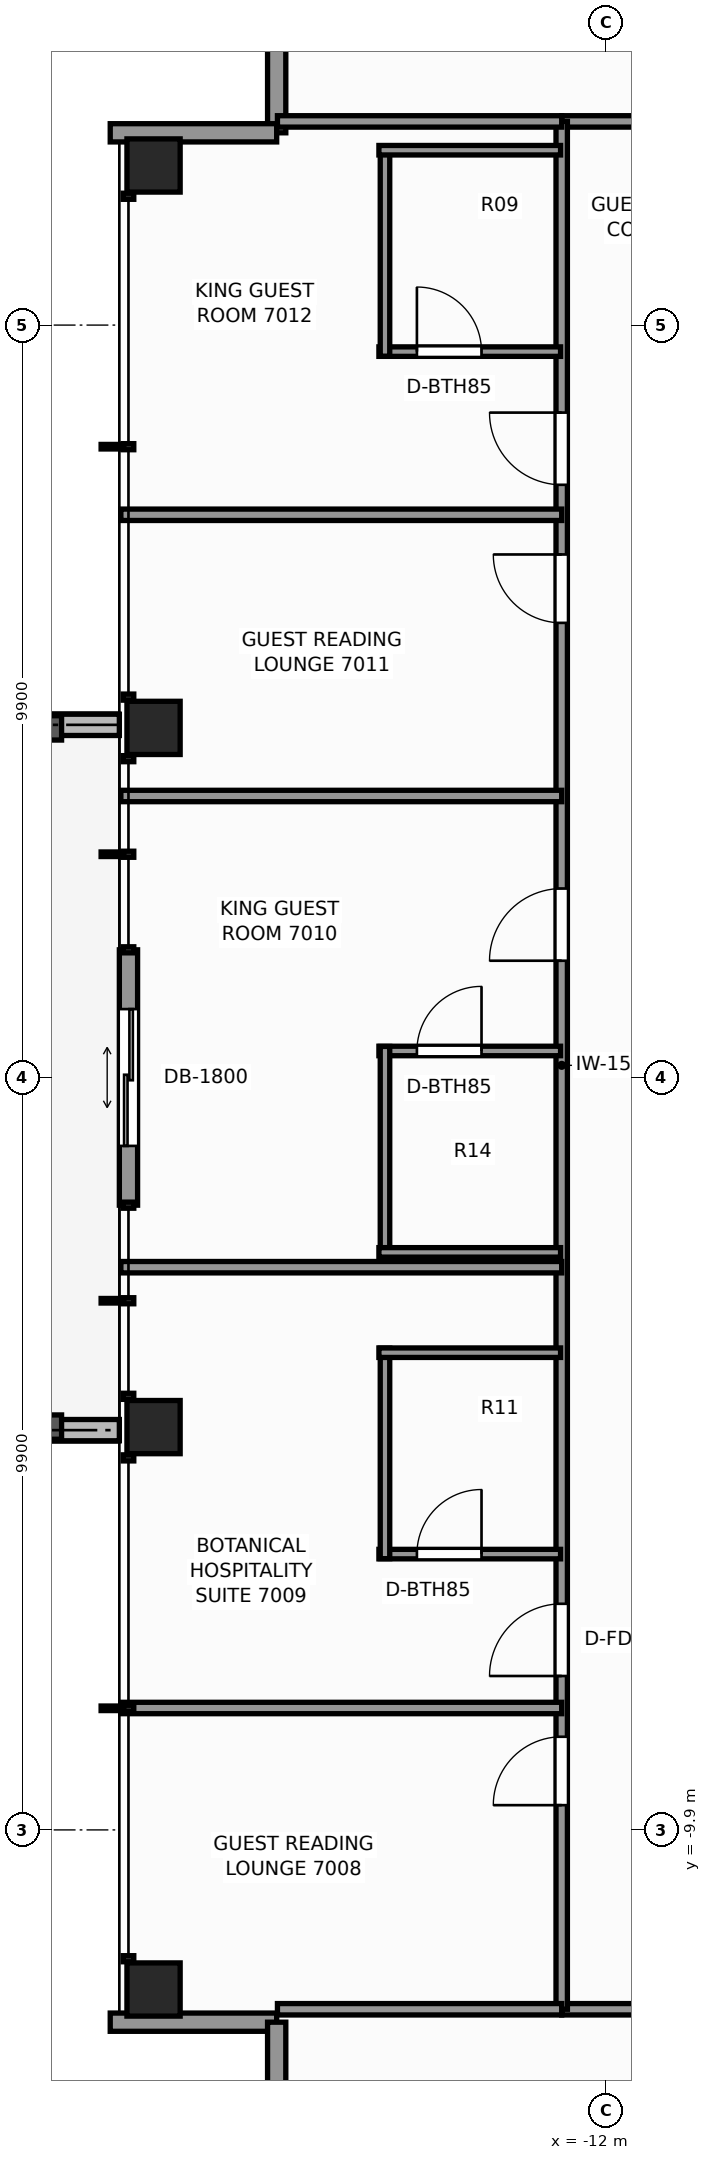
"""IFC4 building model, lengths in metres.
Left out: names, types, materials, properties, quantities, classifications, styles, units other than length and angle.
Written with IfcOpenShell. Run it as: python <this file> out.ifc"""

import sys

from ifc_helpers import new_model, si_unit, direction, frame, frame_2d, origin, origin_2d, place, context, subcontext, project, spatial, rectangle, extrude, element, fill, save


model = new_model("IFC4")
c1 = context("Model", 3, precision=1e-05, world=origin(), true_north=direction((0.0, 1.0)))
c2 = subcontext(c1, "Body", "Model", "MODEL_VIEW")
j1 = project(units=[si_unit("LENGTHUNIT", "METRE"), si_unit("PLANEANGLEUNIT", "RADIAN")], contexts=[c1])
p1 = place(None, origin())
s1 = spatial("IfcSite", under=j1, at=p1, CompositionType="ELEMENT")
p2 = place(p1, origin())
s2 = spatial("IfcBuilding", under=s1, at=p2, CompositionType="ELEMENT")
p3 = place(p2, frame((0.0, 0.0, 240.9)))
s3 = spatial("IfcBuildingStorey", under=s2, at=p3, CompositionType="ELEMENT", Elevation=240.9)
for number, where, z_axis, x_axis in (
    (1, (-17.95, -12.0, 0.0), (0.0, 0.0, 1.0), (1.0, 0.0, 0.0)),
    (2, (-17.95, -4.6, 0.0), (0.0, 0.0, 1.0), (1.0, 0.0, 0.0)),
    (3, (-17.95, 4.6, 0.0), (0.0, 0.0, 1.0), (1.0, 0.0, 0.0)),
    (4, (-17.95, 12.0, 0.0), (0.0, 0.0, 1.0), (1.0, 0.0, 0.0)),
):
    element("IfcColumn", number, at=place(p3, frame(where, z_axis=z_axis, x_axis=x_axis)), inside=s3, PredefinedType="COLUMN", context=c2, shape_type="SweptSolid", body=[
        extrude(rectangle(XDim=0.7, YDim=0.7, at=origin_2d()), origin(), (0.0, 0.0, 1.0), 3.5),
    ])
for number, where, z_axis, x_axis in (
    (5, (-21.7, -4.64, -0.07), (0.0, 0.0, 1.0), (1.0, 0.0, 0.0)),
    (6, (-18.4, 4.64, -0.07), (0.0, 0.0, 1.0), (-1.0, 0.0, 0.0)),
):
    element("IfcWall", number, at=place(p3, frame(where, z_axis=z_axis, x_axis=x_axis)), inside=s3, PredefinedType="PARAPET", context=c2, shape_type="SweptSolid", body=[
        extrude(rectangle(XDim=3.3, YDim=0.28, at=frame_2d((1.65, 0.0))), origin(), (0.0, 0.0, 1.0), 0.42),
    ])
p4 = place(p3, frame((-16.33, 12.43, 0.0), z_axis=(0.0, 0.0, 1.0), x_axis=(0.0, 1.0, 0.0)))
e7 = element("IfcWall", 7, at=p4, inside=s3, PredefinedType="STANDARD", context=c2, shape_type="SweptSolid", body=[
    extrude(rectangle(XDim=2.19, YDim=0.24, at=frame_2d((1.095, 0.0))), origin(), (0.0, 0.0, 1.0), 2.633),
])
p5 = place(p3, frame((-18.52, 12.43, 0.0), z_axis=(0.0, 0.0, 1.0), x_axis=(1.0, 0.0, 0.0)))
e8 = element("IfcWall", 8, at=p5, inside=s3, PredefinedType="STANDARD", context=c2, shape_type="SweptSolid", body=[
    extrude(rectangle(XDim=2.19, YDim=0.24, at=frame_2d((1.095, 0.0))), origin(), (0.0, 0.0, 1.0), 2.633),
])
p6 = place(p3, frame((-18.28, -1.68, 0.0), z_axis=(0.0, 0.0, 1.0), x_axis=(0.0, 1.0, 0.0)))
e9 = element("IfcWall", 9, at=p6, inside=s3, PredefinedType="STANDARD", context=c2, shape_type="SweptSolid", body=[
    extrude(rectangle(XDim=3.36, YDim=0.24, at=frame_2d((1.68, 0.0))), origin(), (0.0, 0.0, 1.0), 3.25),
])
p7 = place(p6, frame((0.78, 0.0, 0.0)))
e10 = element("IfcOpeningElement", 10, at=p7, cuts=e9, PredefinedType="OPENING", context=c2, shape_type="SweptSolid", body=[
    extrude(rectangle(XDim=1.8, YDim=2.2, at=frame_2d((0.9, 1.1))), frame((0.0, 0.13, 0.0), z_axis=(0.0, -1.0, 0.0), x_axis=(1.0, 0.0, 0.0)), (0.0, 0.0, 1.0), 0.26),
])
p8 = place(p3, frame((-16.33, -12.43, 0.0), z_axis=(0.0, 0.0, 1.0), x_axis=(-1.0, 0.0, 0.0)))
e11 = element("IfcWall", 11, at=p8, inside=s3, PredefinedType="STANDARD", context=c2, shape_type="SweptSolid", body=[
    extrude(rectangle(XDim=2.19, YDim=0.24, at=frame_2d((1.095, 0.0))), origin(), (0.0, 0.0, 1.0), 2.633),
])
p9 = place(p3, frame((-16.33, -14.62, 0.0), z_axis=(0.0, 0.0, 1.0), x_axis=(0.0, 1.0, 0.0)))
e12 = element("IfcWall", 12, at=p9, inside=s3, PredefinedType="STANDARD", context=c2, shape_type="SweptSolid", body=[
    extrude(rectangle(XDim=2.19, YDim=0.24, at=frame_2d((1.095, 0.0))), origin(), (0.0, 0.0, 1.0), 2.633),
])
p10 = place(p3, frame((-12.58, -12.26, 0.0), z_axis=(0.0, 0.0, 1.0), x_axis=(1.0, 0.0, 0.0)))
e13 = element("IfcWall", 13, at=p10, inside=s3, PredefinedType="PARTITIONING", context=c2, shape_type="SweptSolid", body=[
    extrude(rectangle(XDim=24.84, YDim=0.15, at=frame_2d((12.42, 0.0))), origin(), (0.0, 0.0, 1.0), 2.539),
])
p11 = place(p10, frame((4.398, 0.0, 0.0)))
e14 = element("IfcOpeningElement", 14, at=p11, cuts=e13, PredefinedType="OPENING", context=c2, shape_type="SweptSolid", body=[
    extrude(rectangle(XDim=0.9, YDim=2.06, at=frame_2d((0.45, 1.03))), frame((0.0, 0.085, 0.0), z_axis=(0.0, -1.0, 0.0), x_axis=(1.0, 0.0, 0.0)), (0.0, 0.0, 1.0), 0.17),
])
p12 = place(p10, frame((8.99, 0.0, 0.0)))
e15 = element("IfcOpeningElement", 15, at=p12, cuts=e13, PredefinedType="OPENING", context=c2, shape_type="SweptSolid", body=[
    extrude(rectangle(XDim=0.9, YDim=2.06, at=frame_2d((0.45, 1.03))), frame((0.0, 0.085, 0.0), z_axis=(0.0, -1.0, 0.0), x_axis=(1.0, 0.0, 0.0)), (0.0, 0.0, 1.0), 0.17),
])
p13 = place(p10, frame((13.129, 0.0, 0.0)))
e16 = element("IfcOpeningElement", 16, at=p13, cuts=e13, PredefinedType="OPENING", context=c2, shape_type="SweptSolid", body=[
    extrude(rectangle(XDim=0.95, YDim=2.06, at=frame_2d((0.475, 1.03))), frame((0.0, 0.085, 0.0), z_axis=(0.0, -1.0, 0.0), x_axis=(1.0, 0.0, 0.0)), (0.0, 0.0, 1.0), 0.17),
])
p14 = place(p10, frame((18.402, 0.0, 0.0)))
e17 = element("IfcOpeningElement", 17, at=p14, cuts=e13, PredefinedType="OPENING", context=c2, shape_type="SweptSolid", body=[
    extrude(rectangle(XDim=0.9, YDim=2.06, at=frame_2d((0.45, 1.03))), frame((0.0, 0.085, 0.0), z_axis=(0.0, -1.0, 0.0), x_axis=(1.0, 0.0, 0.0)), (0.0, 0.0, 1.0), 0.17),
])
p15 = place(p10, frame((20.737, 0.0, 0.0)))
e18 = element("IfcOpeningElement", 18, at=p15, cuts=e13, PredefinedType="OPENING", context=c2, shape_type="SweptSolid", body=[
    extrude(rectangle(XDim=0.9, YDim=2.06, at=frame_2d((0.45, 1.03))), frame((0.0, 0.085, 0.0), z_axis=(0.0, -1.0, 0.0), x_axis=(1.0, 0.0, 0.0)), (0.0, 0.0, 1.0), 0.17),
])
p16 = place(p3, frame((-12.58, 12.58, 0.0), z_axis=(0.0, 0.0, 1.0), x_axis=(1.0, 0.0, 0.0)))
e19 = element("IfcWall", 19, at=p16, inside=s3, PredefinedType="PARTITIONING", context=c2, shape_type="SweptSolid", body=[
    extrude(rectangle(XDim=24.84, YDim=0.15, at=frame_2d((12.42, 0.0))), origin(), (0.0, 0.0, 1.0), 2.539),
])
p17 = place(p16, frame((3.321, 0.0, 0.0)))
e20 = element("IfcOpeningElement", 20, at=p17, cuts=e19, PredefinedType="OPENING", context=c2, shape_type="SweptSolid", body=[
    extrude(rectangle(XDim=0.95, YDim=2.06, at=frame_2d((0.475, 1.03))), frame((0.0, 0.085, 0.0), z_axis=(0.0, -1.0, 0.0), x_axis=(1.0, 0.0, 0.0)), (0.0, 0.0, 1.0), 0.17),
])
p18 = place(p16, frame((9.988, 0.0, 0.0)))
e21 = element("IfcOpeningElement", 21, at=p18, cuts=e19, PredefinedType="OPENING", context=c2, shape_type="SweptSolid", body=[
    extrude(rectangle(XDim=0.95, YDim=2.06, at=frame_2d((0.475, 1.03))), frame((0.0, 0.085, 0.0), z_axis=(0.0, -1.0, 0.0), x_axis=(1.0, 0.0, 0.0)), (0.0, 0.0, 1.0), 0.17),
])
p19 = place(p16, frame((19.986, 0.0, 0.0)))
e22 = element("IfcOpeningElement", 22, at=p19, cuts=e19, PredefinedType="OPENING", context=c2, shape_type="SweptSolid", body=[
    extrude(rectangle(XDim=0.95, YDim=2.06, at=frame_2d((0.475, 1.03))), frame((0.0, 0.085, 0.0), z_axis=(0.0, -1.0, 0.0), x_axis=(1.0, 0.0, 0.0)), (0.0, 0.0, 1.0), 0.17),
])
p20 = place(p3, frame((-12.58, -12.26, 0.0), z_axis=(0.0, 0.0, 1.0), x_axis=(0.0, 1.0, 0.0)))
e23 = element("IfcWall", 23, at=p20, inside=s3, PredefinedType="PARTITIONING", context=c2, shape_type="SweptSolid", body=[
    extrude(rectangle(XDim=24.84, YDim=0.15, at=frame_2d((12.42, 0.0))), origin(), (0.0, 0.0, 1.0), 2.539),
])
p21 = place(p20, frame((2.686, 0.0, 0.0)))
e24 = element("IfcOpeningElement", 24, at=p21, cuts=e23, PredefinedType="OPENING", context=c2, shape_type="SweptSolid", body=[
    extrude(rectangle(XDim=0.9, YDim=2.06, at=frame_2d((0.45, 1.03))), frame((0.0, 0.085, 0.0), z_axis=(0.0, -1.0, 0.0), x_axis=(1.0, 0.0, 0.0)), (0.0, 0.0, 1.0), 0.17),
])
p22 = place(p20, frame((4.385, 0.0, 0.0)))
e25 = element("IfcOpeningElement", 25, at=p22, cuts=e23, PredefinedType="OPENING", context=c2, shape_type="SweptSolid", body=[
    extrude(rectangle(XDim=0.95, YDim=2.06, at=frame_2d((0.475, 1.03))), frame((0.0, 0.085, 0.0), z_axis=(0.0, -1.0, 0.0), x_axis=(1.0, 0.0, 0.0)), (0.0, 0.0, 1.0), 0.17),
])
p23 = place(p20, frame((13.796, 0.0, 0.0)))
e26 = element("IfcOpeningElement", 26, at=p23, cuts=e23, PredefinedType="OPENING", context=c2, shape_type="SweptSolid", body=[
    extrude(rectangle(XDim=0.95, YDim=2.06, at=frame_2d((0.475, 1.03))), frame((0.0, 0.085, 0.0), z_axis=(0.0, -1.0, 0.0), x_axis=(1.0, 0.0, 0.0)), (0.0, 0.0, 1.0), 0.17),
])
p24 = place(p20, frame((18.242, 0.0, 0.0)))
e27 = element("IfcOpeningElement", 27, at=p24, cuts=e23, PredefinedType="OPENING", context=c2, shape_type="SweptSolid", body=[
    extrude(rectangle(XDim=0.9, YDim=2.06, at=frame_2d((0.45, 1.03))), frame((0.0, 0.085, 0.0), z_axis=(0.0, -1.0, 0.0), x_axis=(1.0, 0.0, 0.0)), (0.0, 0.0, 1.0), 0.17),
])
p25 = place(p20, frame((20.059, 0.0, 0.0)))
e28 = element("IfcOpeningElement", 28, at=p25, cuts=e23, PredefinedType="OPENING", context=c2, shape_type="SweptSolid", body=[
    extrude(rectangle(XDim=0.95, YDim=2.06, at=frame_2d((0.475, 1.03))), frame((0.0, 0.085, 0.0), z_axis=(0.0, -1.0, 0.0), x_axis=(1.0, 0.0, 0.0)), (0.0, 0.0, 1.0), 0.17),
])
for number, where, z_axis, x_axis in (
    (29, (-16.32, -12.26, 0.0), (0.0, 0.0, 1.0), (1.0, 0.0, 0.0)),
    (30, (-16.32, 12.58, 0.0), (0.0, 0.0, 1.0), (1.0, 0.0, 0.0)),
):
    element("IfcWall", number, at=place(p3, frame(where, z_axis=z_axis, x_axis=x_axis)), inside=s3, PredefinedType="PARTITIONING", context=c2, shape_type="SweptSolid", body=[
        extrude(rectangle(XDim=3.74, YDim=0.15, at=frame_2d((1.87, 0.0))), origin(), (0.0, 0.0, 1.0), 3.25),
    ])
for number, where, z_axis, x_axis in (
    (31, (-18.38, -8.296, 0.0), (0.0, 0.0, 1.0), (1.0, 0.0, 0.0)),
    (32, (-18.38, -2.496, 0.0), (0.0, 0.0, 1.0), (1.0, 0.0, 0.0)),
):
    element("IfcWall", number, at=place(p3, frame(where, z_axis=z_axis, x_axis=x_axis)), inside=s3, PredefinedType="PARTITIONING", context=c2, shape_type="SweptSolid", body=[
        extrude(rectangle(XDim=5.8, YDim=0.15, at=frame_2d((2.9, 0.0))), origin(), (0.0, 0.0, 1.0), 2.623),
    ])
p26 = place(p3, frame((-14.985, -6.271, 0.0), z_axis=(0.0, 0.0, 1.0), x_axis=(1.0, 0.0, 0.0)))
e33 = element("IfcWall", 33, at=p26, inside=s3, PredefinedType="PARTITIONING", context=c2, shape_type="SweptSolid", body=[
    extrude(rectangle(XDim=2.39, YDim=0.125, at=frame_2d((1.195, 0.0))), origin(), (0.0, 0.0, 1.0), 3.25),
])
p27 = place(p26, frame((0.5, 0.0, 0.0)))
e34 = element("IfcOpeningElement", 34, at=p27, cuts=e33, PredefinedType="OPENING", context=c2, shape_type="SweptSolid", body=[
    extrude(rectangle(XDim=0.85, YDim=2.03, at=frame_2d((0.425, 1.015))), frame((0.0, 0.073, 0.0), z_axis=(0.0, -1.0, 0.0), x_axis=(1.0, 0.0, 0.0)), (0.0, 0.0, 1.0), 0.145),
])
p28 = place(p3, frame((-14.905, -6.331, 0.0), z_axis=(0.0, 0.0, 1.0), x_axis=(0.0, 1.0, 0.0)))
e35 = element("IfcWall", 35, at=p28, inside=s3, PredefinedType="PARTITIONING", context=c2, shape_type="SweptSolid", body=[
    extrude(rectangle(XDim=2.77, YDim=0.125, at=frame_2d((1.385, 0.0))), origin(), (0.0, 0.0, 1.0), 2.539),
])
p29 = place(p3, frame((-14.985, -3.621, 0.0), z_axis=(0.0, 0.0, 1.0), x_axis=(1.0, 0.0, 0.0)))
e36 = element("IfcWall", 36, at=p29, inside=s3, PredefinedType="PARTITIONING", context=c2, shape_type="SweptSolid", body=[
    extrude(rectangle(XDim=2.39, YDim=0.125, at=frame_2d((1.195, 0.0))), origin(), (0.0, 0.0, 1.0), 3.25),
])
p30 = place(p3, frame((-18.38, 3.704, 0.0), z_axis=(0.0, 0.0, 1.0), x_axis=(1.0, 0.0, 0.0)))
e37 = element("IfcWall", 37, at=p30, inside=s3, PredefinedType="PARTITIONING", context=c2, shape_type="SweptSolid", body=[
    extrude(rectangle(XDim=5.8, YDim=0.15, at=frame_2d((2.9, 0.0))), origin(), (0.0, 0.0, 1.0), 2.623),
])
p31 = place(p3, frame((-14.985, 0.349, 0.0), z_axis=(0.0, 0.0, 1.0), x_axis=(1.0, 0.0, 0.0)))
e38 = element("IfcWall", 38, at=p31, inside=s3, PredefinedType="PARTITIONING", context=c2, shape_type="SweptSolid", body=[
    extrude(rectangle(XDim=2.39, YDim=0.125, at=frame_2d((1.195, 0.0))), origin(), (0.0, 0.0, 1.0), 3.25),
])
p32 = place(p31, frame((0.5, 0.0, 0.0)))
e39 = element("IfcOpeningElement", 39, at=p32, cuts=e38, PredefinedType="OPENING", context=c2, shape_type="SweptSolid", body=[
    extrude(rectangle(XDim=0.85, YDim=2.03, at=frame_2d((0.425, 1.015))), frame((0.0, 0.073, 0.0), z_axis=(0.0, -1.0, 0.0), x_axis=(1.0, 0.0, 0.0)), (0.0, 0.0, 1.0), 0.145),
])
p33 = place(p3, frame((-14.905, -2.361, 0.0), z_axis=(0.0, 0.0, 1.0), x_axis=(0.0, 1.0, 0.0)))
e40 = element("IfcWall", 40, at=p33, inside=s3, PredefinedType="PARTITIONING", context=c2, shape_type="SweptSolid", body=[
    extrude(rectangle(XDim=2.77, YDim=0.125, at=frame_2d((1.385, 0.0))), origin(), (0.0, 0.0, 1.0), 2.775),
])
p34 = place(p3, frame((-14.985, -2.301, 0.0), z_axis=(0.0, 0.0, 1.0), x_axis=(1.0, 0.0, 0.0)))
e41 = element("IfcWall", 41, at=p34, inside=s3, PredefinedType="PARTITIONING", context=c2, shape_type="SweptSolid", body=[
    extrude(rectangle(XDim=2.39, YDim=0.125, at=frame_2d((1.195, 0.0))), origin(), (0.0, 0.0, 1.0), 3.25),
])
p35 = place(p3, frame((-18.38, 7.404, 0.0), z_axis=(0.0, 0.0, 1.0), x_axis=(1.0, 0.0, 0.0)))
e42 = element("IfcWall", 42, at=p35, inside=s3, PredefinedType="PARTITIONING", context=c2, shape_type="SweptSolid", body=[
    extrude(rectangle(XDim=5.8, YDim=0.15, at=frame_2d((2.9, 0.0))), origin(), (0.0, 0.0, 1.0), 2.623),
])
p36 = place(p3, frame((-14.985, 9.551, 0.0), z_axis=(0.0, 0.0, 1.0), x_axis=(1.0, 0.0, 0.0)))
e43 = element("IfcWall", 43, at=p36, inside=s3, PredefinedType="PARTITIONING", context=c2, shape_type="SweptSolid", body=[
    extrude(rectangle(XDim=2.39, YDim=0.125, at=frame_2d((1.195, 0.0))), origin(), (0.0, 0.0, 1.0), 3.25),
])
p37 = place(p36, frame((0.5, 0.0, 0.0)))
e44 = element("IfcOpeningElement", 44, at=p37, cuts=e43, PredefinedType="OPENING", context=c2, shape_type="SweptSolid", body=[
    extrude(rectangle(XDim=0.85, YDim=2.03, at=frame_2d((0.425, 1.015))), frame((0.0, 0.073, 0.0), z_axis=(0.0, -1.0, 0.0), x_axis=(1.0, 0.0, 0.0)), (0.0, 0.0, 1.0), 0.145),
])
p38 = place(p3, frame((-14.905, 9.491, 0.0), z_axis=(0.0, 0.0, 1.0), x_axis=(0.0, 1.0, 0.0)))
e45 = element("IfcWall", 45, at=p38, inside=s3, PredefinedType="PARTITIONING", context=c2, shape_type="SweptSolid", body=[
    extrude(rectangle(XDim=2.77, YDim=0.125, at=frame_2d((1.385, 0.0))), origin(), (0.0, 0.0, 1.0), 2.539),
])
p39 = place(p3, frame((-14.985, 12.201, 0.0), z_axis=(0.0, 0.0, 1.0), x_axis=(1.0, 0.0, 0.0)))
e46 = element("IfcWall", 46, at=p39, inside=s3, PredefinedType="PARTITIONING", context=c2, shape_type="SweptSolid", body=[
    extrude(rectangle(XDim=2.39, YDim=0.125, at=frame_2d((1.195, 0.0))), origin(), (0.0, 0.0, 1.0), 3.25),
])
p40 = place(p7, origin())
e47 = element("IfcDoor", 47, at=p40, inside=s3, OperationType="DOUBLE_DOOR_SLIDING", PredefinedType="DOOR", context=c2, shape_type="SweptSolid", body=[
    extrude(rectangle(XDim=1.8, YDim=2.2, at=frame_2d((0.9, 1.1))), frame((0.0, 0.025, 0.0), z_axis=(0.0, -1.0, 0.0), x_axis=(1.0, 0.0, 0.0)), (0.0, 0.0, 1.0), 0.05),
])
fill(e10, e47)
p41 = place(p21, origin())
e48 = element("IfcDoor", 48, at=p41, inside=s3, OperationType="SINGLE_SWING_LEFT", PredefinedType="DOOR", context=c2, shape_type="SweptSolid", body=[
    extrude(rectangle(XDim=0.9, YDim=2.06, at=frame_2d((0.45, 1.03))), frame((0.0, 0.025, 0.0), z_axis=(0.0, -1.0, 0.0), x_axis=(1.0, 0.0, 0.0)), (0.0, 0.0, 1.0), 0.05),
])
fill(e24, e48)
p42 = place(p27, origin())
e49 = element("IfcDoor", 49, at=p42, inside=s3, OperationType="SINGLE_SWING_RIGHT", PredefinedType="DOOR", context=c2, shape_type="SweptSolid", body=[
    extrude(rectangle(XDim=0.85, YDim=2.03, at=frame_2d((0.425, 1.015))), frame((0.0, 0.025, 0.0), z_axis=(0.0, -1.0, 0.0), x_axis=(1.0, 0.0, 0.0)), (0.0, 0.0, 1.0), 0.05),
])
fill(e34, e49)
p43 = place(p22, origin())
e50 = element("IfcDoor", 50, at=p43, inside=s3, OperationType="SINGLE_SWING_LEFT", PredefinedType="DOOR", context=c2, shape_type="SweptSolid", body=[
    extrude(rectangle(XDim=0.95, YDim=2.06, at=frame_2d((0.475, 1.03))), frame((0.0, 0.025, 0.0), z_axis=(0.0, -1.0, 0.0), x_axis=(1.0, 0.0, 0.0)), (0.0, 0.0, 1.0), 0.05),
])
fill(e25, e50)
p44 = place(p32, origin())
e51 = element("IfcDoor", 51, at=p44, inside=s3, OperationType="SINGLE_SWING_RIGHT", PredefinedType="DOOR", context=c2, shape_type="SweptSolid", body=[
    extrude(rectangle(XDim=0.85, YDim=2.03, at=frame_2d((0.425, 1.015))), frame((0.0, 0.025, 0.0), z_axis=(0.0, -1.0, 0.0), x_axis=(1.0, 0.0, 0.0)), (0.0, 0.0, 1.0), 0.05),
])
fill(e39, e51)
p45 = place(p23, origin())
e52 = element("IfcDoor", 52, at=p45, inside=s3, OperationType="SINGLE_SWING_LEFT", PredefinedType="DOOR", context=c2, shape_type="SweptSolid", body=[
    extrude(rectangle(XDim=0.95, YDim=2.06, at=frame_2d((0.475, 1.03))), frame((0.0, 0.025, 0.0), z_axis=(0.0, -1.0, 0.0), x_axis=(1.0, 0.0, 0.0)), (0.0, 0.0, 1.0), 0.05),
])
fill(e26, e52)
p46 = place(p24, origin())
e53 = element("IfcDoor", 53, at=p46, inside=s3, OperationType="SINGLE_SWING_RIGHT", PredefinedType="DOOR", context=c2, shape_type="SweptSolid", body=[
    extrude(rectangle(XDim=0.9, YDim=2.06, at=frame_2d((0.45, 1.03))), frame((0.0, 0.025, 0.0), z_axis=(0.0, -1.0, 0.0), x_axis=(1.0, 0.0, 0.0)), (0.0, 0.0, 1.0), 0.05),
])
fill(e27, e53)
p47 = place(p37, origin())
e54 = element("IfcDoor", 54, at=p47, inside=s3, OperationType="SINGLE_SWING_LEFT", PredefinedType="DOOR", context=c2, shape_type="SweptSolid", body=[
    extrude(rectangle(XDim=0.85, YDim=2.03, at=frame_2d((0.425, 1.015))), frame((0.0, 0.025, 0.0), z_axis=(0.0, -1.0, 0.0), x_axis=(1.0, 0.0, 0.0)), (0.0, 0.0, 1.0), 0.05),
])
fill(e44, e54)
p48 = place(p25, origin())
e55 = element("IfcDoor", 55, at=p48, inside=s3, OperationType="SINGLE_SWING_RIGHT", PredefinedType="DOOR", context=c2, shape_type="SweptSolid", body=[
    extrude(rectangle(XDim=0.95, YDim=2.06, at=frame_2d((0.475, 1.03))), frame((0.0, 0.025, 0.0), z_axis=(0.0, -1.0, 0.0), x_axis=(1.0, 0.0, 0.0)), (0.0, 0.0, 1.0), 0.05),
])
fill(e28, e55)
save(model, sys.argv[1])
